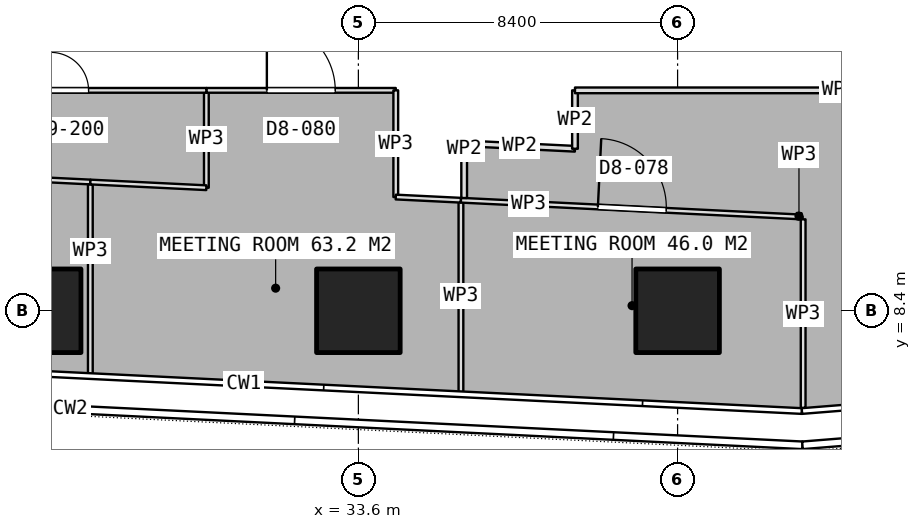
"""IFC4 building model, lengths in metres.
Left out: names, types, materials, properties, quantities, classifications, styles, units other than length and angle.
Written with IfcOpenShell. Run it as: python <this file> out.ifc"""

import sys

from ifc_helpers import new_model, si_unit, direction, frame, frame_2d, origin, origin_2d, place, context, subcontext, project, spatial, rectangle, extrude, element, fill, save


model = new_model("IFC4")
c1 = context("Model", 3, precision=1e-05, world=origin(), true_north=direction((0.0, 1.0)))
c2 = subcontext(c1, "Body", "Model", "MODEL_VIEW")
j1 = project(units=[si_unit("LENGTHUNIT", "METRE"), si_unit("PLANEANGLEUNIT", "RADIAN")], contexts=[c1])
p1 = place(None, origin())
s1 = spatial("IfcSite", under=j1, at=p1, CompositionType="ELEMENT")
p2 = place(p1, origin())
s2 = spatial("IfcBuilding", under=s1, at=p2, CompositionType="ELEMENT")
p3 = place(p2, frame((0.0, 0.0, 62.9)))
s3 = spatial("IfcBuildingStorey", under=s2, at=p3, CompositionType="ELEMENT", Elevation=62.9)
for number, where, z_axis, x_axis in (
    (1, (25.2, 8.4, 0.0), (0.0, 0.0, 1.0), (1.0, 0.0, 0.0)),
    (2, (33.6, 8.4, 0.0), (0.0, 0.0, 1.0), (1.0, 0.0, 0.0)),
    (3, (42.0, 8.4, 0.0), (0.0, 0.0, 1.0), (1.0, 0.0, 0.0)),
):
    element("IfcColumn", number, at=place(p3, frame(where, z_axis=z_axis, x_axis=x_axis)), inside=s3, PredefinedType="COLUMN", context=c2, shape_type="SweptSolid", body=[
        extrude(rectangle(XDim=2.2, YDim=2.2, at=origin_2d()), origin(), (0.0, 0.0, 1.0), 3.75),
    ])
p4 = place(p3, frame((45.304, 10.806, 0.0), z_axis=(0.0, 0.0, 1.0), x_axis=(0.0, -1.0, 0.0)))
e4 = element("IfcWall", 4, at=p4, inside=s3, PredefinedType="PARTITIONING", context=c2, shape_type="SweptSolid", body=[
    extrude(rectangle(XDim=4.961, YDim=0.125, at=frame_2d((2.48, 0.0))), origin(), (0.0, 0.0, 1.0), 3.5),
])
p5 = place(p3, frame((36.299, 6.253, 0.0), z_axis=(0.0, 0.0, 1.0), x_axis=(0.0, 1.0, 0.0)))
e5 = element("IfcWall", 5, at=p5, inside=s3, PredefinedType="PARTITIONING", context=c2, shape_type="SweptSolid", body=[
    extrude(rectangle(XDim=5.056, YDim=0.125, at=frame_2d((2.528, 0.0))), origin(), (0.0, 0.0, 1.0), 3.5),
])
p6 = place(p3, frame((36.299, 11.309, 0.0), z_axis=(0.0, 0.0, 1.0), x_axis=(0.998795041163, -0.049076121979, 0.0)))
e6 = element("IfcWall", 6, at=p6, inside=s3, PredefinedType="PARTITIONING", context=c2, shape_type="SweptSolid", body=[
    extrude(rectangle(XDim=8.905, YDim=0.125, at=frame_2d((4.452, 0.0))), origin(), (0.0, 0.0, 1.0), 3.5),
])
p7 = place(p6, frame((3.608, 0.0, 0.0)))
e7 = element("IfcOpeningElement", 7, at=p7, cuts=e6, PredefinedType="OPENING", context=c2, shape_type="SweptSolid", body=[
    extrude(rectangle(XDim=1.8, YDim=2.1, at=frame_2d((0.9, 1.05))), frame((0.0, 0.073, 0.0), z_axis=(0.0, -1.0, 0.0), x_axis=(1.0, 0.0, 0.0)), (0.0, 0.0, 1.0), 0.145),
])
p8 = place(p3, frame((15.586, 12.326, 0.0), z_axis=(0.0, 0.0, 1.0), x_axis=(0.998798341691, -0.04900890364, 0.0)))
e8 = element("IfcWall", 8, at=p8, inside=s3, PredefinedType="PARTITIONING", context=c2, shape_type="SweptSolid", body=[
    extrude(rectangle(XDim=10.974, YDim=0.125, at=frame_2d((5.487, 0.0))), origin(), (0.0, 0.0, 1.0), 3.5),
])
p9 = place(p8, frame((4.615, 0.0, 0.0)))
e9 = element("IfcOpeningElement", 9, at=p9, cuts=e8, PredefinedType="OPENING", context=c2, shape_type="SweptSolid", body=[
    extrude(rectangle(XDim=1.8, YDim=2.1, at=frame_2d((0.9, 1.05))), frame((0.0, 0.073, 0.0), z_axis=(0.0, -1.0, 0.0), x_axis=(1.0, 0.0, 0.0)), (0.0, 0.0, 1.0), 0.145),
])
p10 = place(p3, frame((26.547, 11.725, 0.0), z_axis=(0.0, 0.0, 1.0), x_axis=(0.0, -1.0, 0.0)))
e10 = element("IfcWall", 10, at=p10, inside=s3, PredefinedType="PARTITIONING", context=c2, shape_type="SweptSolid", body=[
    extrude(rectangle(XDim=4.993, YDim=0.125, at=frame_2d((2.497, 0.0))), origin(), (0.0, 0.0, 1.0), 3.5),
])
p11 = place(p3, frame((29.6, 11.638, 0.0), z_axis=(0.0, 0.0, 1.0), x_axis=(0.0, 1.0, 0.0)))
e11 = element("IfcWall", 11, at=p11, inside=s3, PredefinedType="PARTITIONING", context=c2, shape_type="SweptSolid", body=[
    extrude(rectangle(XDim=2.562, YDim=0.125, at=frame_2d((1.281, 0.0))), origin(), (0.0, 0.0, 1.0), 3.5),
])
p12 = place(p3, frame((29.6, 14.2, 0.0), z_axis=(0.0, 0.0, 1.0), x_axis=(1.0, 0.0, 0.0)))
e12 = element("IfcWall", 12, at=p12, inside=s3, PredefinedType="PARTITIONING", context=c2, shape_type="SweptSolid", body=[
    extrude(rectangle(XDim=4.984, YDim=0.125, at=frame_2d((2.492, 0.0))), origin(), (0.0, 0.0, 1.0), 3.5),
])
p13 = place(p12, frame((1.592, 0.0, 0.0)))
e13 = element("IfcOpeningElement", 13, at=p13, cuts=e12, PredefinedType="OPENING", context=c2, shape_type="SweptSolid", body=[
    extrude(rectangle(XDim=1.8, YDim=2.1, at=frame_2d((0.9, 1.05))), frame((0.0, 0.073, 0.0), z_axis=(0.0, -1.0, 0.0), x_axis=(1.0, 0.0, 0.0)), (0.0, 0.0, 1.0), 0.145),
])
p14 = place(p3, frame((34.584, 14.2, 0.0), z_axis=(0.0, 0.0, 1.0), x_axis=(0.0, -1.0, 0.0)))
e14 = element("IfcWall", 14, at=p14, inside=s3, PredefinedType="PARTITIONING", context=c2, shape_type="SweptSolid", body=[
    extrude(rectangle(XDim=2.807, YDim=0.125, at=frame_2d((1.403, 0.0))), origin(), (0.0, 0.0, 1.0), 3.5),
])
p15 = place(p3, frame((34.584, 11.393, 0.0), z_axis=(0.0, 0.0, 1.0), x_axis=(0.998801859142, -0.048937165581, 0.0)))
e15 = element("IfcWall", 15, at=p15, inside=s3, PredefinedType="PARTITIONING", context=c2, shape_type="SweptSolid", body=[
    extrude(rectangle(XDim=1.716, YDim=0.125, at=frame_2d((0.858, 0.0))), origin(), (0.0, 0.0, 1.0), 3.5),
])
p16 = place(p3, frame((26.548, 11.788, 0.0), z_axis=(0.0, 0.0, 1.0), x_axis=(0.998792065816, -0.049136638707, 0.0)))
e16 = element("IfcWall", 16, at=p16, inside=s3, PredefinedType="PARTITIONING", context=c2, shape_type="SweptSolid", body=[
    extrude(rectangle(XDim=3.056, YDim=0.125, at=frame_2d((1.528, 0.0))), origin(), (0.0, 0.0, 1.0), 3.5),
])
p17 = place(p3, frame((22.4, 14.2, 0.0), z_axis=(0.0, 0.0, 1.0), x_axis=(1.0, 0.0, 0.0)))
e17 = element("IfcWall", 17, at=p17, inside=s3, PredefinedType="PARTITIONING", context=c2, shape_type="SweptSolid", body=[
    extrude(rectangle(XDim=7.2, YDim=0.125, at=frame_2d((3.6, 0.0))), origin(), (0.0, 0.0, 1.0), 3.5),
])
p18 = place(p17, frame((3.1, 0.0, 0.0)))
e18 = element("IfcOpeningElement", 18, at=p18, cuts=e17, PredefinedType="OPENING", context=c2, shape_type="SweptSolid", body=[
    extrude(rectangle(XDim=1.0, YDim=2.1, at=frame_2d((0.5, 1.05))), frame((0.0, 0.073, 0.0), z_axis=(0.0, -1.0, 0.0), x_axis=(1.0, 0.0, 0.0)), (0.0, 0.0, 1.0), 0.145),
])
p19 = place(p3, frame((36.384, 11.367, 0.0), z_axis=(0.0, 0.0, 1.0), x_axis=(0.0, 1.0, 0.0)))
e19 = element("IfcWall", 19, at=p19, inside=s3, PredefinedType="PARTITIONING", context=c2, shape_type="SweptSolid", body=[
    extrude(rectangle(XDim=1.439, YDim=0.15, at=frame_2d((0.719, 0.0))), origin(), (0.0, 0.0, 1.0), 3.5),
])
p20 = place(p3, frame((36.384, 12.806, 0.0), z_axis=(0.0, 0.0, 1.0), x_axis=(0.99880270372, -0.048919924789, 0.0)))
e20 = element("IfcWall", 20, at=p20, inside=s3, PredefinedType="PARTITIONING", context=c2, shape_type="SweptSolid", body=[
    extrude(rectangle(XDim=2.919, YDim=0.15, at=frame_2d((1.46, 0.0))), origin(), (0.0, 0.0, 1.0), 3.5),
])
p21 = place(p3, frame((39.3, 12.663, 0.0), z_axis=(0.0, 0.0, 1.0), x_axis=(0.0, 1.0, 0.0)))
e21 = element("IfcWall", 21, at=p21, inside=s3, PredefinedType="PARTITIONING", context=c2, shape_type="SweptSolid", body=[
    extrude(rectangle(XDim=1.537, YDim=0.15, at=frame_2d((0.769, 0.0))), origin(), (0.0, 0.0, 1.0), 3.5),
])
p22 = place(p3, frame((39.3, 14.2, 0.0), z_axis=(0.0, 0.0, 1.0), x_axis=(1.0, 0.0, 0.0)))
e22 = element("IfcWall", 22, at=p22, inside=s3, PredefinedType="PARTITIONING", context=c2, shape_type="SweptSolid", body=[
    extrude(rectangle(XDim=13.9, YDim=0.15, at=frame_2d((6.95, 0.0))), origin(), (0.0, 0.0, 1.0), 3.5),
])
p23 = place(p3, frame((45.19, 10.81, 0.0), z_axis=(0.0, 0.0, 1.0), x_axis=(0.050013205413, 0.998748556587, 0.0)))
e23 = element("IfcWall", 23, at=p23, inside=s3, PredefinedType="PARTITIONING", context=c2, shape_type="SweptSolid", body=[
    extrude(rectangle(XDim=0.161, YDim=0.125, at=frame_2d((0.081, 0.0))), origin(), (0.0, 0.0, 1.0), 3.5),
])
p24 = place(p7, origin())
e24 = element("IfcDoor", 24, at=p24, inside=s3, OperationType="DOUBLE_DOOR_SINGLE_SWING", PredefinedType="DOOR", context=c2, shape_type="SweptSolid", body=[
    extrude(rectangle(XDim=1.8, YDim=2.1, at=frame_2d((0.9, 1.05))), frame((0.0, 0.025, 0.0), z_axis=(0.0, -1.0, 0.0), x_axis=(1.0, 0.0, 0.0)), (0.0, 0.0, 1.0), 0.05),
])
fill(e7, e24)
p25 = place(p13, origin())
e25 = element("IfcDoor", 25, at=p25, inside=s3, OperationType="DOUBLE_DOOR_SINGLE_SWING", PredefinedType="DOOR", context=c2, shape_type="SweptSolid", body=[
    extrude(rectangle(XDim=1.8, YDim=2.1, at=frame_2d((0.9, 1.05))), frame((0.0, 0.025, 0.0), z_axis=(0.0, -1.0, 0.0), x_axis=(1.0, 0.0, 0.0)), (0.0, 0.0, 1.0), 0.05),
])
fill(e13, e25)
p26 = place(p18, origin())
e26 = element("IfcDoor", 26, at=p26, inside=s3, OperationType="SINGLE_SWING_LEFT", PredefinedType="DOOR", context=c2, shape_type="SweptSolid", body=[
    extrude(rectangle(XDim=1.0, YDim=2.1, at=frame_2d((0.5, 1.05))), frame((0.0, 0.025, 0.0), z_axis=(0.0, -1.0, 0.0), x_axis=(1.0, 0.0, 0.0)), (0.0, 0.0, 1.0), 0.05),
])
fill(e18, e26)
save(model, sys.argv[1])
